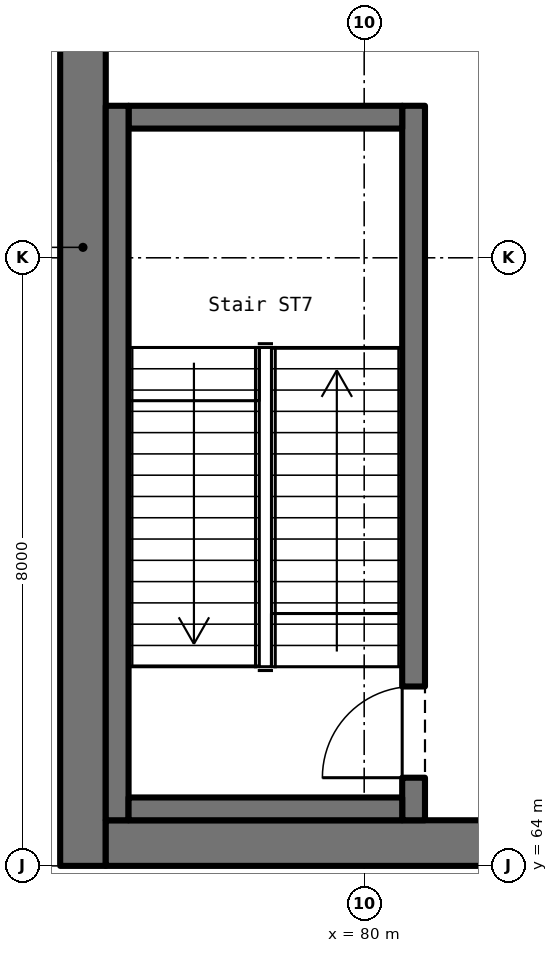
"""IFC4 building model, lengths in metres.
Left out: names, types, materials, properties, quantities, classifications, styles, units other than length and angle.
Written with IfcOpenShell. Run it as: python <this file> out.ifc"""

import sys

from ifc_helpers import new_model, si_unit, direction, frame, frame_2d, origin, place, context, subcontext, project, spatial, rectangle, extrude, element, fill, save


model = new_model("IFC4")
c1 = context("Model", 3, precision=1e-05, world=origin(), true_north=direction((0.0, 1.0)))
c2 = subcontext(c1, "Body", "Model", "MODEL_VIEW")
j1 = project(units=[si_unit("LENGTHUNIT", "METRE"), si_unit("PLANEANGLEUNIT", "RADIAN")], contexts=[c1])
p1 = place(None, origin())
s1 = spatial("IfcSite", under=j1, at=p1, CompositionType="ELEMENT")
p2 = place(p1, origin())
s2 = spatial("IfcBuilding", under=s1, at=p2, CompositionType="ELEMENT")
p3 = place(p2, frame((0.0, 0.0, 11.5)))
s3 = spatial("IfcBuildingStorey", under=s2, at=p3, CompositionType="ELEMENT", Elevation=11.5)
p4 = place(p3, frame((76.3, 64.0, 0.0), z_axis=(0.0, 0.0, 1.0), x_axis=(0.0, 1.0, 0.0)))
e1 = element("IfcWall", 1, at=p4, inside=s3, PredefinedType="SHEAR", context=c2, shape_type="SweptSolid", body=[
    extrude(rectangle(XDim=32.0, YDim=0.6, at=frame_2d((16.0, 0.0))), origin(), (0.0, 0.0, 1.0), 5.5),
])
p5 = place(p4, frame((16.275, 0.0, 1.0)))
e2 = element("IfcOpeningElement", 2, at=p5, cuts=e1, PredefinedType="OPENING", context=c2, shape_type="SweptSolid", body=[
    extrude(rectangle(XDim=0.45, YDim=3.6, at=frame_2d((0.225, 1.8))), frame((0.0, 0.312, 0.0), z_axis=(0.0, -1.0, 0.0), x_axis=(1.0, 0.0, 0.0)), (0.0, 0.0, 1.0), 0.624),
])
p6 = place(p4, frame((19.275, 0.0, 1.0)))
e3 = element("IfcOpeningElement", 3, at=p6, cuts=e1, PredefinedType="OPENING", context=c2, shape_type="SweptSolid", body=[
    extrude(rectangle(XDim=0.45, YDim=3.6, at=frame_2d((0.225, 1.8))), frame((0.0, 0.312, 0.0), z_axis=(0.0, -1.0, 0.0), x_axis=(1.0, 0.0, 0.0)), (0.0, 0.0, 1.0), 0.624),
])
p7 = place(p3, frame((76.6, 64.3, 0.0), z_axis=(0.0, 0.0, 1.0), x_axis=(1.0, 0.0, 0.0)))
e4 = element("IfcWall", 4, at=p7, inside=s3, PredefinedType="SHEAR", context=c2, shape_type="SweptSolid", body=[
    extrude(rectangle(XDim=38.8, YDim=0.6, at=frame_2d((19.4, 0.0))), origin(), (0.0, 0.0, 1.0), 5.5),
])
p8 = place(p3, frame((80.65, 64.6, 0.0), z_axis=(0.0, 0.0, 1.0), x_axis=(0.0, 1.0, 0.0)))
e5 = element("IfcWall", 5, at=p8, inside=s3, PredefinedType="SOLIDWALL", context=c2, shape_type="SweptSolid", body=[
    extrude(rectangle(XDim=9.4, YDim=0.3, at=frame_2d((4.7, 0.0))), origin(), (0.0, 0.0, 1.0), 5.5),
])
p9 = place(p8, frame((0.56, 0.0, 0.0)))
e6 = element("IfcOpeningElement", 6, at=p9, cuts=e5, PredefinedType="OPENING", context=c2, shape_type="SweptSolid", body=[
    extrude(rectangle(XDim=1.2, YDim=2.1, at=frame_2d((0.6, 1.05))), frame((0.0, 0.162, 0.0), z_axis=(0.0, -1.0, 0.0), x_axis=(1.0, 0.0, 0.0)), (0.0, 0.0, 1.0), 0.324),
])
p10 = place(p3, frame((80.5, 73.85, 0.0), z_axis=(0.0, 0.0, 1.0), x_axis=(-1.0, 0.0, 0.0)))
e7 = element("IfcWall", 7, at=p10, inside=s3, PredefinedType="SOLIDWALL", context=c2, shape_type="SweptSolid", body=[
    extrude(rectangle(XDim=3.6, YDim=0.3, at=frame_2d((1.8, 0.0))), origin(), (0.0, 0.0, 1.0), 5.5),
])
p11 = place(p3, frame((76.75, 74.0, 0.0), z_axis=(0.0, 0.0, 1.0), x_axis=(0.0, -1.0, 0.0)))
e8 = element("IfcWall", 8, at=p11, inside=s3, PredefinedType="SOLIDWALL", context=c2, shape_type="SweptSolid", body=[
    extrude(rectangle(XDim=9.4, YDim=0.3, at=frame_2d((4.7, 0.0))), origin(), (0.0, 0.0, 1.0), 5.5),
])
p12 = place(p3, frame((76.9, 64.75, 0.0), z_axis=(0.0, 0.0, 1.0), x_axis=(1.0, 0.0, 0.0)))
e9 = element("IfcWall", 9, at=p12, inside=s3, PredefinedType="SOLIDWALL", context=c2, shape_type="SweptSolid", body=[
    extrude(rectangle(XDim=3.6, YDim=0.3, at=frame_2d((1.8, 0.0))), origin(), (0.0, 0.0, 1.0), 5.5),
])
p13 = place(p9, origin())
e10 = element("IfcDoor", 10, at=p13, inside=s3, OperationType="SINGLE_SWING_LEFT", PredefinedType="DOOR", context=c2, shape_type="SweptSolid", body=[
    extrude(rectangle(XDim=1.2, YDim=2.1, at=frame_2d((0.6, 1.05))), frame((0.0, 0.025, 0.0), z_axis=(0.0, -1.0, 0.0), x_axis=(1.0, 0.0, 0.0)), (0.0, 0.0, 1.0), 0.05),
])
fill(e6, e10)
save(model, sys.argv[1])
